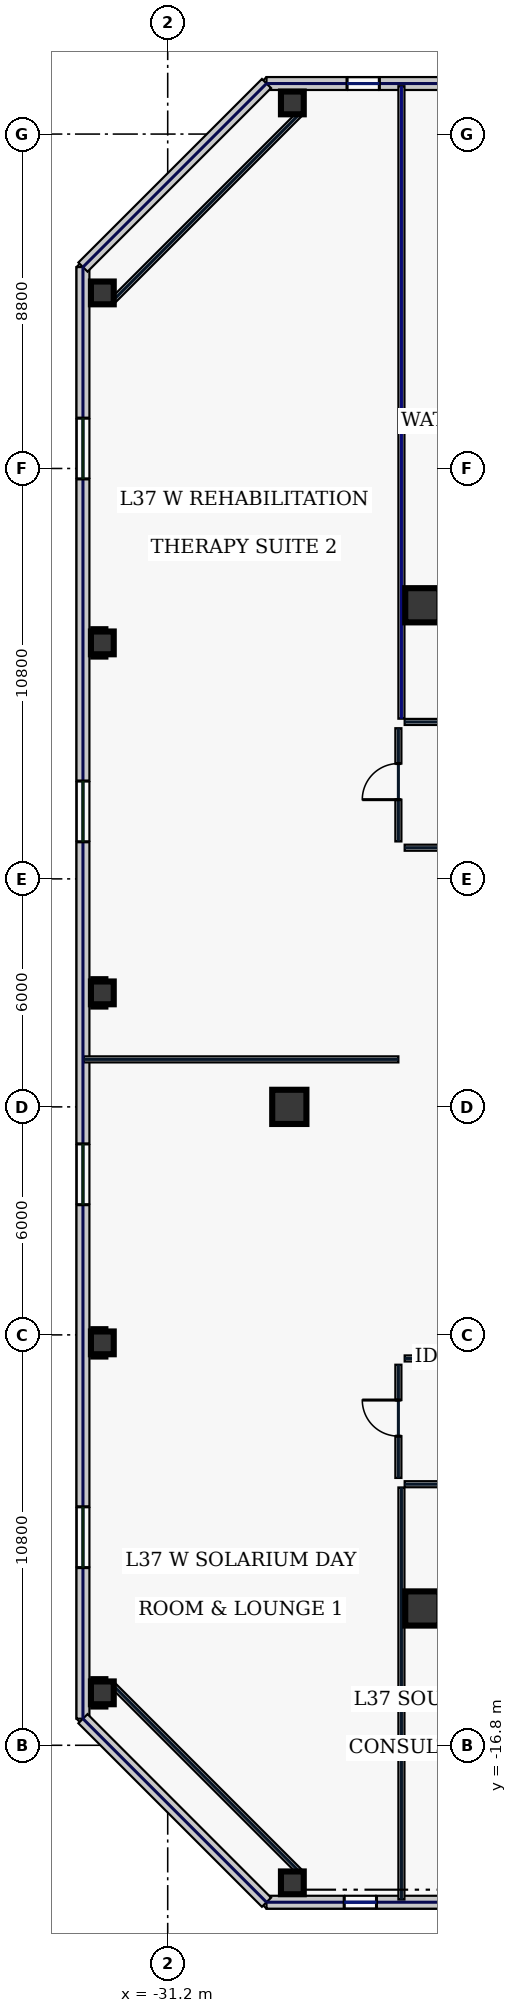
"""IFC4 building model, lengths in metres.
Left out: names, types, materials, properties, quantities, classifications, styles, units other than length and angle.
Written with IfcOpenShell. Run it as: python <this file> out.ifc"""

import sys

from ifc_helpers import new_model, si_unit, direction, frame, frame_2d, origin, origin_2d, place, context, subcontext, project, spatial, rectangle, hollow_rectangle, extrude, element, fill, save


model = new_model("IFC4")
c1 = context("Model", 3, precision=1e-05, world=origin(), true_north=direction((0.0, 1.0)))
c2 = subcontext(c1, "Body", "Model", "MODEL_VIEW")
j1 = project(units=[si_unit("LENGTHUNIT", "METRE"), si_unit("PLANEANGLEUNIT", "RADIAN")], contexts=[c1])
p1 = place(None, origin())
s1 = spatial("IfcSite", under=j1, at=p1, CompositionType="ELEMENT")
p2 = place(p1, origin())
s2 = spatial("IfcBuilding", under=s1, at=p2, CompositionType="ELEMENT")
p3 = place(p2, frame((0.0, 0.0, 164.2)))
s3 = spatial("IfcBuildingStorey", under=s2, at=p3, CompositionType="ELEMENT", Elevation=164.2)
for number, where, z_axis, x_axis in (
    (1, (-24.5, -13.2, 0.0), (0.0, 0.0, 1.0), (1.0, 0.0, 0.0)),
    (2, (-24.5, 13.2, 0.0), (0.0, 0.0, 1.0), (1.0, 0.0, 0.0)),
    (3, (-28.0, 0.0, 0.0), (0.0, 0.0, 1.0), (1.0, 0.0, 0.0)),
):
    element("IfcColumn", number, at=place(p3, frame(where, z_axis=z_axis, x_axis=x_axis)), inside=s3, PredefinedType="COLUMN", context=c2, shape_type="SweptSolid", body=[
        extrude(hollow_rectangle(XDim=0.9, YDim=0.9, WallThickness=0.04, at=origin_2d()), origin(), (0.0, 0.0, 1.0), 3.74),
    ])
for number, where, z_axis, x_axis in (
    (4, (-27.92, -20.42, 0.0), (0.0, 0.0, 1.0), (1.0, 0.0, 0.0)),
    (5, (-27.92, 26.42, 0.0), (0.0, 0.0, 1.0), (1.0, 0.0, 0.0)),
    (6, (-32.92, 21.42, 0.0), (0.0, 0.0, 1.0), (1.0, 0.0, 0.0)),
    (7, (-32.92, 12.21, 0.0), (0.0, 0.0, 1.0), (1.0, 0.0, 0.0)),
    (8, (-32.92, 3.0, 0.0), (0.0, 0.0, 1.0), (1.0, 0.0, 0.0)),
    (9, (-32.92, -6.21, 0.0), (0.0, 0.0, 1.0), (1.0, 0.0, 0.0)),
    (10, (-32.92, -15.42, 0.0), (0.0, 0.0, 1.0), (1.0, 0.0, 0.0)),
):
    element("IfcColumn", number, at=place(p3, frame(where, z_axis=z_axis, x_axis=x_axis)), inside=s3, PredefinedType="COLUMN", context=c2, shape_type="SweptSolid", body=[
        extrude(hollow_rectangle(XDim=0.6, YDim=0.6, WallThickness=0.028, at=origin_2d()), origin(), (0.0, 0.0, 1.0), 3.74),
    ])
p4 = place(p3, frame((-28.6, -20.93, 0.0), z_axis=(0.0, 0.0, 1.0), x_axis=(1.0, 0.0, 0.0)))
e11 = element("IfcWall", 11, at=p4, inside=s3, PredefinedType="STANDARD", context=c2, shape_type="SweptSolid", body=[
    extrude(rectangle(XDim=15.95, YDim=0.34, at=frame_2d((7.975, 0.0))), origin(), (0.0, 0.0, 1.0), 3.74),
])
p5 = place(p4, frame((2.044, 0.0, 0.8)))
e12 = element("IfcOpeningElement", 12, at=p5, cuts=e11, PredefinedType="OPENING", context=c2, shape_type="SweptSolid", body=[
    extrude(rectangle(XDim=0.85, YDim=1.85, at=frame_2d((0.425, 0.925))), frame((0.0, 0.18, 0.0), z_axis=(0.0, -1.0, 0.0), x_axis=(1.0, 0.0, 0.0)), (0.0, 0.0, 1.0), 0.36),
])
p6 = place(p4, frame((6.029, 0.0, 0.8)))
e13 = element("IfcOpeningElement", 13, at=p6, cuts=e11, PredefinedType="OPENING", context=c2, shape_type="SweptSolid", body=[
    extrude(rectangle(XDim=0.85, YDim=1.85, at=frame_2d((0.425, 0.925))), frame((0.0, 0.18, 0.0), z_axis=(0.0, -1.0, 0.0), x_axis=(1.0, 0.0, 0.0)), (0.0, 0.0, 1.0), 0.36),
])
p7 = place(p4, frame((10.707, 0.0, 0.8)))
e14 = element("IfcOpeningElement", 14, at=p7, cuts=e11, PredefinedType="OPENING", context=c2, shape_type="SweptSolid", body=[
    extrude(rectangle(XDim=1.95, YDim=2.1, at=frame_2d((0.975, 1.05))), frame((0.0, 0.18, 0.0), z_axis=(0.0, -1.0, 0.0), x_axis=(1.0, 0.0, 0.0)), (0.0, 0.0, 1.0), 0.36),
])
p8 = place(p3, frame((-8.663, 26.93, 0.0), z_axis=(0.0, 0.0, 1.0), x_axis=(-1.0, 0.0, 0.0)))
e15 = element("IfcWall", 15, at=p8, inside=s3, PredefinedType="STANDARD", context=c2, shape_type="SweptSolid", body=[
    extrude(rectangle(XDim=19.937, YDim=0.34, at=frame_2d((9.969, 0.0))), origin(), (0.0, 0.0, 1.0), 3.74),
])
p9 = place(p8, frame((16.968, 0.0, 0.7)))
e16 = element("IfcOpeningElement", 16, at=p9, cuts=e15, PredefinedType="OPENING", context=c2, shape_type="SweptSolid", body=[
    extrude(rectangle(XDim=0.85, YDim=1.85, at=frame_2d((0.425, 0.925))), frame((0.0, 0.18, 0.0), z_axis=(0.0, -1.0, 0.0), x_axis=(1.0, 0.0, 0.0)), (0.0, 0.0, 1.0), 0.36),
])
p10 = place(p8, frame((12.033, 0.0, 0.7)))
e17 = element("IfcOpeningElement", 17, at=p10, cuts=e15, PredefinedType="OPENING", context=c2, shape_type="SweptSolid", body=[
    extrude(rectangle(XDim=1.8, YDim=2.2, at=frame_2d((0.9, 1.1))), frame((0.0, 0.18, 0.0), z_axis=(0.0, -1.0, 0.0), x_axis=(1.0, 0.0, 0.0)), (0.0, 0.0, 1.0), 0.36),
])
p11 = place(p8, frame((3.371, 0.0, 0.7)))
e18 = element("IfcOpeningElement", 18, at=p11, cuts=e15, PredefinedType="OPENING", context=c2, shape_type="SweptSolid", body=[
    extrude(rectangle(XDim=1.8, YDim=2.2, at=frame_2d((0.9, 1.1))), frame((0.0, 0.18, 0.0), z_axis=(0.0, -1.0, 0.0), x_axis=(1.0, 0.0, 0.0)), (0.0, 0.0, 1.0), 0.36),
])
p12 = place(p3, frame((-33.43, 22.1, 0.0), z_axis=(0.0, 0.0, 1.0), x_axis=(0.0, -1.0, 0.0)))
e19 = element("IfcWall", 19, at=p12, inside=s3, PredefinedType="STANDARD", context=c2, shape_type="SweptSolid", body=[
    extrude(rectangle(XDim=38.2, YDim=0.34, at=frame_2d((19.1, 0.0))), origin(), (0.0, 0.0, 1.0), 3.74),
])
p13 = place(p12, frame((3.975, 0.0, 0.58)))
e20 = element("IfcOpeningElement", 20, at=p13, cuts=e19, PredefinedType="OPENING", context=c2, shape_type="SweptSolid", body=[
    extrude(rectangle(XDim=1.6, YDim=2.3, at=frame_2d((0.8, 1.15))), frame((0.0, 0.18, 0.0), z_axis=(0.0, -1.0, 0.0), x_axis=(1.0, 0.0, 0.0)), (0.0, 0.0, 1.0), 0.36),
])
p14 = place(p12, frame((13.525, 0.0, 0.58)))
e21 = element("IfcOpeningElement", 21, at=p14, cuts=e19, PredefinedType="OPENING", context=c2, shape_type="SweptSolid", body=[
    extrude(rectangle(XDim=1.6, YDim=2.3, at=frame_2d((0.8, 1.15))), frame((0.0, 0.18, 0.0), z_axis=(0.0, -1.0, 0.0), x_axis=(1.0, 0.0, 0.0)), (0.0, 0.0, 1.0), 0.36),
])
p15 = place(p12, frame((23.075, 0.0, 0.58)))
e22 = element("IfcOpeningElement", 22, at=p15, cuts=e19, PredefinedType="OPENING", context=c2, shape_type="SweptSolid", body=[
    extrude(rectangle(XDim=1.6, YDim=2.3, at=frame_2d((0.8, 1.15))), frame((0.0, 0.18, 0.0), z_axis=(0.0, -1.0, 0.0), x_axis=(1.0, 0.0, 0.0)), (0.0, 0.0, 1.0), 0.36),
])
p16 = place(p12, frame((32.625, 0.0, 0.58)))
e23 = element("IfcOpeningElement", 23, at=p16, cuts=e19, PredefinedType="OPENING", context=c2, shape_type="SweptSolid", body=[
    extrude(rectangle(XDim=1.6, YDim=2.3, at=frame_2d((0.8, 1.15))), frame((0.0, 0.18, 0.0), z_axis=(0.0, -1.0, 0.0), x_axis=(1.0, 0.0, 0.0)), (0.0, 0.0, 1.0), 0.36),
])
for number, where, z_axis, x_axis in (
    (24, (-28.6, 26.93, 0.0), (0.0, 0.0, 1.0), (-0.707, -0.707, 0.0)),
    (25, (-33.43, -16.1, 0.0), (0.0, 0.0, 1.0), (0.707, -0.707, 0.0)),
):
    element("IfcWall", number, at=place(p3, frame(where, z_axis=z_axis, x_axis=x_axis)), inside=s3, PredefinedType="STANDARD", context=c2, shape_type="SweptSolid", body=[
        extrude(rectangle(XDim=6.83, YDim=0.34, at=frame_2d((3.415, 0.0))), origin(), (0.0, 0.0, 1.0), 3.74),
    ])
for number, where, z_axis, x_axis in (
    (26, (-27.68, 26.18, 0.0), (0.0, 0.0, 1.0), (-0.707, -0.707, 0.0)),
    (27, (-32.68, -15.18, 0.0), (0.0, 0.0, 1.0), (0.707, -0.707, 0.0)),
):
    element("IfcWall", number, at=place(p3, frame(where, z_axis=z_axis, x_axis=x_axis)), inside=s3, PredefinedType="PARTITIONING", context=c2, shape_type="SweptSolid", body=[
        extrude(rectangle(XDim=7.071, YDim=0.16, at=frame_2d((3.536, 0.0))), origin(), (0.0, 0.0, 1.0), 3.74),
    ])
p17 = place(p3, frame((-25.13, -9.765, 0.0), z_axis=(0.0, 0.0, 1.0), x_axis=(0.0, 1.0, 0.0)))
e28 = element("IfcWall", 28, at=p17, inside=s3, PredefinedType="PARTITIONING", context=c2, shape_type="SweptSolid", body=[
    extrude(rectangle(XDim=2.98, YDim=0.16, at=frame_2d((1.49, 0.0))), origin(), (0.0, 0.0, 1.0), 3.74),
])
p18 = place(p17, frame((1.1, 0.0, 0.0)))
e29 = element("IfcOpeningElement", 29, at=p18, cuts=e28, PredefinedType="OPENING", context=c2, shape_type="SweptSolid", body=[
    extrude(rectangle(XDim=0.95, YDim=2.2, at=frame_2d((0.475, 1.1))), frame((0.0, 0.09, 0.0), z_axis=(0.0, -1.0, 0.0), x_axis=(1.0, 0.0, 0.0)), (0.0, 0.0, 1.0), 0.18),
])
for number, where, z_axis, x_axis in (
    (30, (-24.965, -6.62, 0.0), (0.0, 0.0, 1.0), (1.0, 0.0, 0.0)),
    (31, (-10.63, 6.82, 0.0), (0.0, 0.0, 1.0), (-1.0, 0.0, 0.0)),
):
    element("IfcWall", number, at=place(p3, frame(where, z_axis=z_axis, x_axis=x_axis)), inside=s3, PredefinedType="PARTITIONING", context=c2, shape_type="SweptSolid", body=[
        extrude(rectangle(XDim=14.335, YDim=0.16, at=frame_2d((7.167, 0.0))), origin(), (0.0, 0.0, 1.0), 3.74),
    ])
p19 = place(p3, frame((-25.13, 6.985, 0.0), z_axis=(0.0, 0.0, 1.0), x_axis=(0.0, 1.0, 0.0)))
e32 = element("IfcWall", 32, at=p19, inside=s3, PredefinedType="PARTITIONING", context=c2, shape_type="SweptSolid", body=[
    extrude(rectangle(XDim=2.98, YDim=0.16, at=frame_2d((1.49, 0.0))), origin(), (0.0, 0.0, 1.0), 3.74),
])
p20 = place(p19, frame((1.1, 0.0, 0.0)))
e33 = element("IfcOpeningElement", 33, at=p20, cuts=e32, PredefinedType="OPENING", context=c2, shape_type="SweptSolid", body=[
    extrude(rectangle(XDim=0.95, YDim=2.2, at=frame_2d((0.475, 1.1))), frame((0.0, 0.09, 0.0), z_axis=(0.0, -1.0, 0.0), x_axis=(1.0, 0.0, 0.0)), (0.0, 0.0, 1.0), 0.18),
])
p21 = place(p3, frame((-24.965, 10.13, 0.0), z_axis=(0.0, 0.0, 1.0), x_axis=(1.0, 0.0, 0.0)))
e34 = element("IfcWall", 34, at=p21, inside=s3, PredefinedType="PARTITIONING", context=c2, shape_type="SweptSolid", body=[
    extrude(rectangle(XDim=49.93, YDim=0.16, at=frame_2d((24.965, 0.0))), origin(), (0.0, 0.0, 1.0), 3.74),
])
p22 = place(p21, frame((4.044, 0.0, 0.0)))
e35 = element("IfcOpeningElement", 35, at=p22, cuts=e34, PredefinedType="OPENING", context=c2, shape_type="SweptSolid", body=[
    extrude(rectangle(XDim=0.95, YDim=2.2, at=frame_2d((0.475, 1.1))), frame((0.0, 0.09, 0.0), z_axis=(0.0, -1.0, 0.0), x_axis=(1.0, 0.0, 0.0)), (0.0, 0.0, 1.0), 0.18),
])
p23 = place(p21, frame((11.9, 0.0, 0.0)))
e36 = element("IfcOpeningElement", 36, at=p23, cuts=e34, PredefinedType="OPENING", context=c2, shape_type="SweptSolid", body=[
    extrude(rectangle(XDim=1.15, YDim=2.2, at=frame_2d((0.575, 1.1))), frame((0.0, 0.09, 0.0), z_axis=(0.0, -1.0, 0.0), x_axis=(1.0, 0.0, 0.0)), (0.0, 0.0, 1.0), 0.18),
])
p24 = place(p21, frame((18.9, 0.0, 0.0)))
e37 = element("IfcOpeningElement", 37, at=p24, cuts=e34, PredefinedType="OPENING", context=c2, shape_type="SweptSolid", body=[
    extrude(rectangle(XDim=1.05, YDim=2.2, at=frame_2d((0.525, 1.1))), frame((0.0, 0.09, 0.0), z_axis=(0.0, -1.0, 0.0), x_axis=(1.0, 0.0, 0.0)), (0.0, 0.0, 1.0), 0.18),
])
p25 = place(p21, frame((27.03, 0.0, 0.0)))
e38 = element("IfcOpeningElement", 38, at=p25, cuts=e34, PredefinedType="OPENING", context=c2, shape_type="SweptSolid", body=[
    extrude(rectangle(XDim=0.95, YDim=2.2, at=frame_2d((0.475, 1.1))), frame((0.0, 0.09, 0.0), z_axis=(0.0, -1.0, 0.0), x_axis=(1.0, 0.0, 0.0)), (0.0, 0.0, 1.0), 0.18),
])
p26 = place(p21, frame((36.29, 0.0, 0.0)))
e39 = element("IfcOpeningElement", 39, at=p26, cuts=e34, PredefinedType="OPENING", context=c2, shape_type="SweptSolid", body=[
    extrude(rectangle(XDim=0.95, YDim=2.2, at=frame_2d((0.475, 1.1))), frame((0.0, 0.09, 0.0), z_axis=(0.0, -1.0, 0.0), x_axis=(1.0, 0.0, 0.0)), (0.0, 0.0, 1.0), 0.18),
])
p27 = place(p21, frame((44.966, 0.0, 0.0)))
e40 = element("IfcOpeningElement", 40, at=p27, cuts=e34, PredefinedType="OPENING", context=c2, shape_type="SweptSolid", body=[
    extrude(rectangle(XDim=0.95, YDim=2.2, at=frame_2d((0.475, 1.1))), frame((0.0, 0.09, 0.0), z_axis=(0.0, -1.0, 0.0), x_axis=(1.0, 0.0, 0.0)), (0.0, 0.0, 1.0), 0.18),
])
p28 = place(p3, frame((24.965, -9.93, 0.0), z_axis=(0.0, 0.0, 1.0), x_axis=(-1.0, 0.0, 0.0)))
e41 = element("IfcWall", 41, at=p28, inside=s3, PredefinedType="PARTITIONING", context=c2, shape_type="SweptSolid", body=[
    extrude(rectangle(XDim=49.93, YDim=0.16, at=frame_2d((24.965, 0.0))), origin(), (0.0, 0.0, 1.0), 3.74),
])
p29 = place(p28, frame((47.106, 0.0, 0.0)))
e42 = element("IfcOpeningElement", 42, at=p29, cuts=e41, PredefinedType="OPENING", context=c2, shape_type="SweptSolid", body=[
    extrude(rectangle(XDim=0.95, YDim=2.2, at=frame_2d((0.475, 1.1))), frame((0.0, 0.09, 0.0), z_axis=(0.0, -1.0, 0.0), x_axis=(1.0, 0.0, 0.0)), (0.0, 0.0, 1.0), 0.18),
])
p30 = place(p28, frame((42.355, 0.0, 0.0)))
e43 = element("IfcOpeningElement", 43, at=p30, cuts=e41, PredefinedType="OPENING", context=c2, shape_type="SweptSolid", body=[
    extrude(rectangle(XDim=1.05, YDim=2.2, at=frame_2d((0.525, 1.1))), frame((0.0, 0.09, 0.0), z_axis=(0.0, -1.0, 0.0), x_axis=(1.0, 0.0, 0.0)), (0.0, 0.0, 1.0), 0.18),
])
p31 = place(p28, frame((33.93, 0.0, 0.0)))
e44 = element("IfcOpeningElement", 44, at=p31, cuts=e41, PredefinedType="OPENING", context=c2, shape_type="SweptSolid", body=[
    extrude(rectangle(XDim=1.15, YDim=2.2, at=frame_2d((0.575, 1.1))), frame((0.0, 0.09, 0.0), z_axis=(0.0, -1.0, 0.0), x_axis=(1.0, 0.0, 0.0)), (0.0, 0.0, 1.0), 0.18),
])
p32 = place(p28, frame((24.45, 0.0, 0.0)))
e45 = element("IfcOpeningElement", 45, at=p32, cuts=e41, PredefinedType="OPENING", context=c2, shape_type="SweptSolid", body=[
    extrude(rectangle(XDim=0.95, YDim=2.2, at=frame_2d((0.475, 1.1))), frame((0.0, 0.09, 0.0), z_axis=(0.0, -1.0, 0.0), x_axis=(1.0, 0.0, 0.0)), (0.0, 0.0, 1.0), 0.18),
])
p33 = place(p28, frame((15.875, 0.0, 0.0)))
e46 = element("IfcOpeningElement", 46, at=p33, cuts=e41, PredefinedType="OPENING", context=c2, shape_type="SweptSolid", body=[
    extrude(rectangle(XDim=0.95, YDim=2.2, at=frame_2d((0.475, 1.1))), frame((0.0, 0.09, 0.0), z_axis=(0.0, -1.0, 0.0), x_axis=(1.0, 0.0, 0.0)), (0.0, 0.0, 1.0), 0.18),
])
p34 = place(p28, frame((7.575, 0.0, 0.0)))
e47 = element("IfcOpeningElement", 47, at=p34, cuts=e41, PredefinedType="OPENING", context=c2, shape_type="SweptSolid", body=[
    extrude(rectangle(XDim=0.95, YDim=2.2, at=frame_2d((0.475, 1.1))), frame((0.0, 0.09, 0.0), z_axis=(0.0, -1.0, 0.0), x_axis=(1.0, 0.0, 0.0)), (0.0, 0.0, 1.0), 0.18),
])
p35 = place(p28, frame((2.044, 0.0, 0.0)))
e48 = element("IfcOpeningElement", 48, at=p35, cuts=e41, PredefinedType="OPENING", context=c2, shape_type="SweptSolid", body=[
    extrude(rectangle(XDim=1.05, YDim=2.2, at=frame_2d((0.525, 1.1))), frame((0.0, 0.09, 0.0), z_axis=(0.0, -1.0, 0.0), x_axis=(1.0, 0.0, 0.0)), (0.0, 0.0, 1.0), 0.18),
])
p36 = place(p3, frame((-25.05, 10.215, 0.0), z_axis=(0.0, 0.0, 1.0), x_axis=(0.0, 1.0, 0.0)))
e49 = element("IfcWall", 49, at=p36, inside=s3, PredefinedType="PARTITIONING", context=c2, shape_type="SweptSolid", body=[
    extrude(rectangle(XDim=16.645, YDim=0.16, at=frame_2d((8.323, 0.0))), origin(), (0.0, 0.0, 1.0), 3.285),
])
p37 = place(p3, frame((-25.05, -20.86, 0.0), z_axis=(0.0, 0.0, 1.0), x_axis=(0.0, 1.0, 0.0)))
e50 = element("IfcWall", 50, at=p37, inside=s3, PredefinedType="PARTITIONING", context=c2, shape_type="SweptSolid", body=[
    extrude(rectangle(XDim=10.845, YDim=0.16, at=frame_2d((5.423, 0.0))), origin(), (0.0, 0.0, 1.0), 3.74),
])
p38 = place(p3, frame((-33.41, 1.25, 0.0), z_axis=(0.0, 0.0, 1.0), x_axis=(1.0, 0.0, 0.0)))
e51 = element("IfcWall", 51, at=p38, inside=s3, PredefinedType="PARTITIONING", context=c2, shape_type="SweptSolid", body=[
    extrude(rectangle(XDim=8.28, YDim=0.16, at=frame_2d((4.14, 0.0))), origin(), (0.0, 0.0, 1.0), 3.74),
])
p39 = place(p5, origin())
e52 = element("IfcWindow", 52, at=p39, inside=s3, PartitioningType="SINGLE_PANEL", PredefinedType="WINDOW", context=c2, shape_type="SweptSolid", body=[
    extrude(rectangle(XDim=0.85, YDim=1.85, at=frame_2d((0.425, 0.925))), frame((0.0, 0.03, 0.0), z_axis=(0.0, -1.0, 0.0), x_axis=(1.0, 0.0, 0.0)), (0.0, 0.0, 1.0), 0.06),
])
fill(e12, e52)
p40 = place(p9, origin())
e53 = element("IfcWindow", 53, at=p40, inside=s3, PartitioningType="SINGLE_PANEL", PredefinedType="WINDOW", context=c2, shape_type="SweptSolid", body=[
    extrude(rectangle(XDim=0.85, YDim=1.85, at=frame_2d((0.425, 0.925))), frame((0.0, 0.03, 0.0), z_axis=(0.0, -1.0, 0.0), x_axis=(1.0, 0.0, 0.0)), (0.0, 0.0, 1.0), 0.06),
])
fill(e16, e53)
p41 = place(p13, origin())
e54 = element("IfcWindow", 54, at=p41, inside=s3, PartitioningType="SINGLE_PANEL", PredefinedType="WINDOW", context=c2, shape_type="SweptSolid", body=[
    extrude(rectangle(XDim=1.6, YDim=2.3, at=frame_2d((0.8, 1.15))), frame((0.0, 0.03, 0.0), z_axis=(0.0, -1.0, 0.0), x_axis=(1.0, 0.0, 0.0)), (0.0, 0.0, 1.0), 0.06),
])
fill(e20, e54)
p42 = place(p14, origin())
e55 = element("IfcWindow", 55, at=p42, inside=s3, PartitioningType="SINGLE_PANEL", PredefinedType="WINDOW", context=c2, shape_type="SweptSolid", body=[
    extrude(rectangle(XDim=1.6, YDim=2.3, at=frame_2d((0.8, 1.15))), frame((0.0, 0.03, 0.0), z_axis=(0.0, -1.0, 0.0), x_axis=(1.0, 0.0, 0.0)), (0.0, 0.0, 1.0), 0.06),
])
fill(e21, e55)
p43 = place(p15, origin())
e56 = element("IfcWindow", 56, at=p43, inside=s3, PartitioningType="SINGLE_PANEL", PredefinedType="WINDOW", context=c2, shape_type="SweptSolid", body=[
    extrude(rectangle(XDim=1.6, YDim=2.3, at=frame_2d((0.8, 1.15))), frame((0.0, 0.03, 0.0), z_axis=(0.0, -1.0, 0.0), x_axis=(1.0, 0.0, 0.0)), (0.0, 0.0, 1.0), 0.06),
])
fill(e22, e56)
p44 = place(p16, origin())
e57 = element("IfcWindow", 57, at=p44, inside=s3, PartitioningType="SINGLE_PANEL", PredefinedType="WINDOW", context=c2, shape_type="SweptSolid", body=[
    extrude(rectangle(XDim=1.6, YDim=2.3, at=frame_2d((0.8, 1.15))), frame((0.0, 0.03, 0.0), z_axis=(0.0, -1.0, 0.0), x_axis=(1.0, 0.0, 0.0)), (0.0, 0.0, 1.0), 0.06),
])
fill(e23, e57)
p45 = place(p18, origin())
e58 = element("IfcDoor", 58, at=p45, inside=s3, OperationType="SINGLE_SWING_RIGHT", PredefinedType="DOOR", context=c2, shape_type="SweptSolid", body=[
    extrude(rectangle(XDim=0.95, YDim=2.2, at=frame_2d((0.475, 1.1))), frame((0.0, 0.025, 0.0), z_axis=(0.0, -1.0, 0.0), x_axis=(1.0, 0.0, 0.0)), (0.0, 0.0, 1.0), 0.05),
])
fill(e29, e58)
p46 = place(p20, origin())
e59 = element("IfcDoor", 59, at=p46, inside=s3, OperationType="SINGLE_SWING_LEFT", PredefinedType="DOOR", context=c2, shape_type="SweptSolid", body=[
    extrude(rectangle(XDim=0.95, YDim=2.2, at=frame_2d((0.475, 1.1))), frame((0.0, 0.025, 0.0), z_axis=(0.0, -1.0, 0.0), x_axis=(1.0, 0.0, 0.0)), (0.0, 0.0, 1.0), 0.05),
])
fill(e33, e59)
save(model, sys.argv[1])
